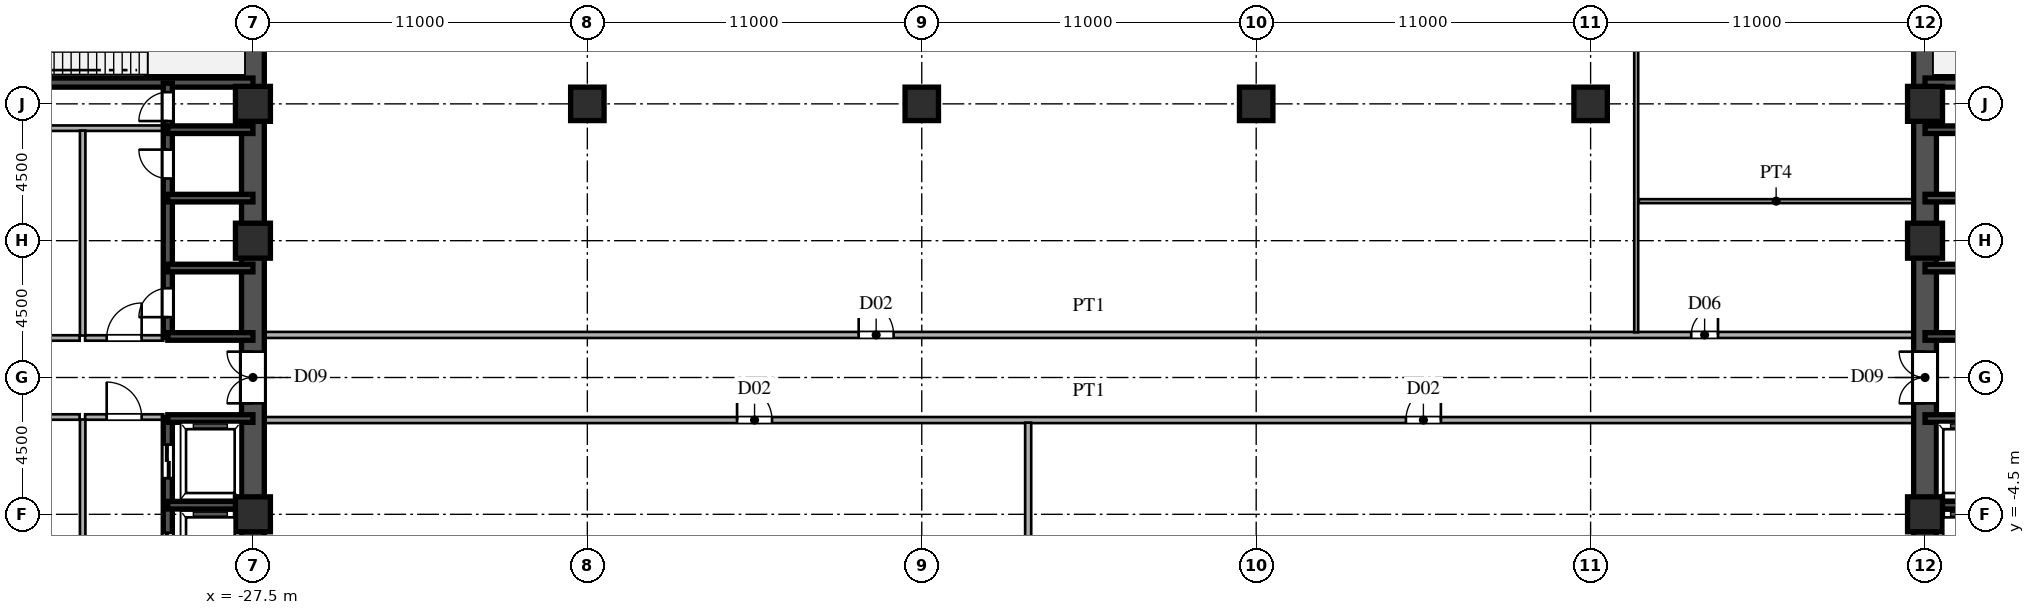
"""IFC4 building model, lengths in metres.
Left out: names, types, materials, properties, quantities, classifications, styles, units other than length and angle.
Written with IfcOpenShell. Run it as: python <this file> out.ifc"""

import sys

from ifc_helpers import new_model, si_unit, direction, frame, frame_2d, origin, origin_2d, place, context, subcontext, project, spatial, rectangle, hollow_rectangle, extrude, source, transform, mapped, element, fill, save


model = new_model("IFC4")
c1 = context("Model", 3, precision=1e-05, world=origin(), true_north=direction((0.0, 1.0)))
c2 = subcontext(c1, "Body", "Model", "MODEL_VIEW")
j1 = project(units=[si_unit("LENGTHUNIT", "METRE"), si_unit("PLANEANGLEUNIT", "RADIAN")], contexts=[c1])
p1 = place(None, origin())
s1 = spatial("IfcSite", under=j1, at=p1, CompositionType="ELEMENT")
p2 = place(p1, origin())
s2 = spatial("IfcBuilding", under=s1, at=p2, CompositionType="ELEMENT")
p3 = place(p2, frame((0.0, 0.0, -9.6)))
s3 = spatial("IfcBuildingStorey", under=s2, at=p3, CompositionType="ELEMENT", Elevation=-9.6)
m1 = source(origin(), c2, "Body", "SweptSolid", [
    extrude(hollow_rectangle(XDim=1.15, YDim=1.15, WallThickness=0.048, at=origin_2d()), origin(), (0.0, 0.0, 1.0), 4.8),
])
for number, where, z_axis, x_axis in (
    (1, (-27.5, -4.5, 0.0), (0.0, 0.0, 1.0), (1.0, 0.0, 0.0)),
    (2, (-27.5, 4.5, 0.0), (0.0, 0.0, 1.0), (1.0, 0.0, 0.0)),
    (3, (-27.5, 9.0, 0.0), (0.0, 0.0, 1.0), (1.0, 0.0, 0.0)),
    (4, (27.5, -4.5, 0.0), (0.0, 0.0, 1.0), (1.0, 0.0, 0.0)),
    (5, (27.5, 4.5, 0.0), (0.0, 0.0, 1.0), (1.0, 0.0, 0.0)),
    (6, (27.5, 9.0, 0.0), (0.0, 0.0, 1.0), (1.0, 0.0, 0.0)),
):
    element("IfcColumn", number, at=place(p3, frame(where, z_axis=z_axis, x_axis=x_axis)), inside=s3, PredefinedType="COLUMN", context=c2, shape_type="MappedRepresentation", body=[
        mapped(m1, transform((0.0, 0.0, 0.0), scale=1.0)),
    ])
m2 = source(origin(), c2, "Body", "SweptSolid", [
    extrude(rectangle(XDim=1.1, YDim=1.1, at=origin_2d()), origin(), (0.0, 0.0, 1.0), 4.8),
])
for number, where, z_axis, x_axis in (
    (7, (-16.5, 9.0, 0.0), (0.0, 0.0, 1.0), (1.0, 0.0, 0.0)),
    (8, (-5.5, 9.0, 0.0), (0.0, 0.0, 1.0), (1.0, 0.0, 0.0)),
    (9, (5.5, 9.0, 0.0), (0.0, 0.0, 1.0), (1.0, 0.0, 0.0)),
    (10, (16.5, 9.0, 0.0), (0.0, 0.0, 1.0), (1.0, 0.0, 0.0)),
):
    element("IfcColumn", number, at=place(p3, frame(where, z_axis=z_axis, x_axis=x_axis)), inside=s3, PredefinedType="COLUMN", context=c2, shape_type="MappedRepresentation", body=[
        mapped(m2, transform((0.0, 0.0, 0.0), scale=1.0)),
    ])
for number, where, z_axis, x_axis in (
    (11, (-27.5, -13.5, 0.0), (0.0, 0.0, 1.0), (0.0, 1.0, 0.0)),
    (12, (-27.5, 1.3, 0.0), (0.0, 0.0, 1.0), (0.0, 1.0, 0.0)),
):
    element("IfcWall", number, at=place(p3, frame(where, z_axis=z_axis, x_axis=x_axis)), inside=s3, PredefinedType="SHEAR", context=c2, shape_type="SweptSolid", body=[
        extrude(rectangle(XDim=12.2, YDim=0.75, at=frame_2d((6.1, 0.0))), origin(), (0.0, 0.0, 1.0), 4.5),
    ])
p4 = place(p3, frame((-27.5, -1.3, 0.0), z_axis=(0.0, 0.0, 1.0), x_axis=(0.0, 1.0, 0.0)))
e13 = element("IfcWall", 13, at=p4, inside=s3, PredefinedType="SHEAR", context=c2, shape_type="SweptSolid", body=[
    extrude(rectangle(XDim=2.6, YDim=0.75, at=frame_2d((1.3, 0.0))), origin(), (0.0, 0.0, 1.0), 4.5),
])
p5 = place(p4, frame((0.45, 0.0, 0.0)))
e14 = element("IfcOpeningElement", 14, at=p5, cuts=e13, PredefinedType="OPENING", context=c2, shape_type="SweptSolid", body=[
    extrude(rectangle(XDim=1.7, YDim=2.35, at=frame_2d((0.85, 1.175))), frame((0.0, 0.385, 0.0), z_axis=(0.0, -1.0, 0.0), x_axis=(1.0, 0.0, 0.0)), (0.0, 0.0, 1.0), 0.77),
])
p6 = place(p3, frame((-36.5, 9.7, 0.0), z_axis=(0.0, 0.0, 1.0), x_axis=(1.0, 0.0, 0.0)))
e15 = element("IfcWall", 15, at=p6, inside=s3, PredefinedType="SHEAR", context=c2, shape_type="SweptSolid", body=[
    extrude(rectangle(XDim=9.0, YDim=0.3, at=frame_2d((4.5, 0.0))), origin(), (0.0, 0.0, 1.0), 4.5),
])
p7 = place(p6, frame((0.6, 0.0, 0.0)))
e16 = element("IfcOpeningElement", 16, at=p7, cuts=e15, PredefinedType="OPENING", context=c2, shape_type="SweptSolid", body=[
    extrude(rectangle(XDim=1.1, YDim=2.2, at=frame_2d((0.55, 1.1))), frame((0.0, 0.16, 0.0), z_axis=(0.0, -1.0, 0.0), x_axis=(1.0, 0.0, 0.0)), (0.0, 0.0, 1.0), 0.32),
])
for number, where, z_axis, x_axis in (
    (17, (-30.3, -4.2, 0.0), (0.0, 0.0, 1.0), (1.0, 0.0, 0.0)),
    (18, (-30.3, -1.35, 0.0), (0.0, 0.0, 1.0), (1.0, 0.0, 0.0)),
    (19, (-30.3, 1.35, 0.0), (0.0, 0.0, 1.0), (1.0, 0.0, 0.0)),
    (20, (-30.3, 3.6, 0.0), (0.0, 0.0, 1.0), (1.0, 0.0, 0.0)),
    (21, (-30.3, 5.9, 0.0), (0.0, 0.0, 1.0), (1.0, 0.0, 0.0)),
    (22, (-30.3, 8.15, 0.0), (0.0, 0.0, 1.0), (1.0, 0.0, 0.0)),
):
    element("IfcWall", number, at=place(p3, frame(where, z_axis=z_axis, x_axis=x_axis)), inside=s3, PredefinedType="SHEAR", context=c2, shape_type="SweptSolid", body=[
        extrude(rectangle(XDim=2.8, YDim=0.25, at=frame_2d((1.4, 0.0))), origin(), (0.0, 0.0, 1.0), 4.5),
    ])
p8 = place(p3, frame((-30.3, -7.12, 0.0), z_axis=(0.0, 0.0, 1.0), x_axis=(0.0, 1.0, 0.0)))
e23 = element("IfcWall", 23, at=p8, inside=s3, PredefinedType="SHEAR", context=c2, shape_type="SweptSolid", body=[
    extrude(rectangle(XDim=2.92, YDim=0.3, at=frame_2d((1.46, 0.0))), origin(), (0.0, 0.0, 1.0), 4.5),
])
p9 = place(p8, frame((0.91, 0.0, 0.0)))
e24 = element("IfcOpeningElement", 24, at=p9, cuts=e23, PredefinedType="OPENING", context=c2, shape_type="SweptSolid", body=[
    extrude(rectangle(XDim=1.1, YDim=2.2, at=frame_2d((0.55, 1.1))), frame((0.0, 0.16, 0.0), z_axis=(0.0, -1.0, 0.0), x_axis=(1.0, 0.0, 0.0)), (0.0, 0.0, 1.0), 0.32),
])
p10 = place(p3, frame((-30.3, -4.2, 0.0), z_axis=(0.0, 0.0, 1.0), x_axis=(0.0, 1.0, 0.0)))
e25 = element("IfcWall", 25, at=p10, inside=s3, PredefinedType="SHEAR", context=c2, shape_type="SweptSolid", body=[
    extrude(rectangle(XDim=2.88, YDim=0.3, at=frame_2d((1.44, 0.0))), origin(), (0.0, 0.0, 1.0), 4.5),
])
p11 = place(p10, frame((0.89, 0.0, 0.0)))
e26 = element("IfcOpeningElement", 26, at=p11, cuts=e25, PredefinedType="OPENING", context=c2, shape_type="SweptSolid", body=[
    extrude(rectangle(XDim=1.1, YDim=2.2, at=frame_2d((0.55, 1.1))), frame((0.0, 0.16, 0.0), z_axis=(0.0, -1.0, 0.0), x_axis=(1.0, 0.0, 0.0)), (0.0, 0.0, 1.0), 0.32),
])
p12 = place(p3, frame((-30.3, 1.32, 0.0), z_axis=(0.0, 0.0, 1.0), x_axis=(0.0, 1.0, 0.0)))
e27 = element("IfcWall", 27, at=p12, inside=s3, PredefinedType="SHEAR", context=c2, shape_type="SweptSolid", body=[
    extrude(rectangle(XDim=2.28, YDim=0.3, at=frame_2d((1.14, 0.0))), origin(), (0.0, 0.0, 1.0), 4.5),
])
p13 = place(p12, frame((0.665, 0.0, 0.0)))
e28 = element("IfcOpeningElement", 28, at=p13, cuts=e27, PredefinedType="OPENING", context=c2, shape_type="SweptSolid", body=[
    extrude(rectangle(XDim=0.95, YDim=2.15, at=frame_2d((0.475, 1.075))), frame((0.0, 0.16, 0.0), z_axis=(0.0, -1.0, 0.0), x_axis=(1.0, 0.0, 0.0)), (0.0, 0.0, 1.0), 0.32),
])
p14 = place(p3, frame((-30.3, 3.6, 0.0), z_axis=(0.0, 0.0, 1.0), x_axis=(0.0, 1.0, 0.0)))
e29 = element("IfcWall", 29, at=p14, inside=s3, PredefinedType="SHEAR", context=c2, shape_type="SweptSolid", body=[
    extrude(rectangle(XDim=2.3, YDim=0.3, at=frame_2d((1.15, 0.0))), origin(), (0.0, 0.0, 1.0), 4.5),
])
p15 = place(p3, frame((-30.3, 5.9, 0.0), z_axis=(0.0, 0.0, 1.0), x_axis=(0.0, 1.0, 0.0)))
e30 = element("IfcWall", 30, at=p15, inside=s3, PredefinedType="SHEAR", context=c2, shape_type="SweptSolid", body=[
    extrude(rectangle(XDim=2.25, YDim=0.3, at=frame_2d((1.125, 0.0))), origin(), (0.0, 0.0, 1.0), 4.5),
])
p16 = place(p15, frame((0.645, 0.0, 0.0)))
e31 = element("IfcOpeningElement", 31, at=p16, cuts=e30, PredefinedType="OPENING", context=c2, shape_type="SweptSolid", body=[
    extrude(rectangle(XDim=0.95, YDim=2.15, at=frame_2d((0.475, 1.075))), frame((0.0, 0.16, 0.0), z_axis=(0.0, -1.0, 0.0), x_axis=(1.0, 0.0, 0.0)), (0.0, 0.0, 1.0), 0.32),
])
p17 = place(p3, frame((-30.3, 8.15, 0.0), z_axis=(0.0, 0.0, 1.0), x_axis=(0.0, 1.0, 0.0)))
e32 = element("IfcWall", 32, at=p17, inside=s3, PredefinedType="SHEAR", context=c2, shape_type="SweptSolid", body=[
    extrude(rectangle(XDim=1.53, YDim=0.3, at=frame_2d((0.765, 0.0))), origin(), (0.0, 0.0, 1.0), 4.5),
])
p18 = place(p17, frame((0.285, 0.0, 0.0)))
e33 = element("IfcOpeningElement", 33, at=p18, cuts=e32, PredefinedType="OPENING", context=c2, shape_type="SweptSolid", body=[
    extrude(rectangle(XDim=0.95, YDim=2.15, at=frame_2d((0.475, 1.075))), frame((0.0, 0.16, 0.0), z_axis=(0.0, -1.0, 0.0), x_axis=(1.0, 0.0, 0.0)), (0.0, 0.0, 1.0), 0.32),
])
p19 = place(p3, frame((-36.15, 8.2, 0.0), z_axis=(0.0, 0.0, 1.0), x_axis=(1.0, 0.0, 0.0)))
e34 = element("IfcWall", 34, at=p19, inside=s3, PredefinedType="PARTITIONING", context=c2, shape_type="SweptSolid", body=[
    extrude(rectangle(XDim=5.7, YDim=0.18, at=frame_2d((2.85, 0.0))), origin(), (0.0, 0.0, 1.0), 4.5),
])
p20 = place(p3, frame((-33.1, -6.42, 0.0), z_axis=(0.0, 0.0, 1.0), x_axis=(0.0, 1.0, 0.0)))
e35 = element("IfcWall", 35, at=p20, inside=s3, PredefinedType="PARTITIONING", context=c2, shape_type="SweptSolid", body=[
    extrude(rectangle(XDim=5.04, YDim=0.18, at=frame_2d((2.52, 0.0))), origin(), (0.0, 0.0, 1.0), 4.5),
])
p21 = place(p3, frame((-33.1, 1.38, 0.0), z_axis=(0.0, 0.0, 1.0), x_axis=(0.0, 1.0, 0.0)))
e36 = element("IfcWall", 36, at=p21, inside=s3, PredefinedType="PARTITIONING", context=c2, shape_type="SweptSolid", body=[
    extrude(rectangle(XDim=6.74, YDim=0.18, at=frame_2d((3.37, 0.0))), origin(), (0.0, 0.0, 1.0), 4.5),
])
p22 = place(p3, frame((-33.02, -1.3, 0.0), z_axis=(0.0, 0.0, 1.0), x_axis=(1.0, 0.0, 0.0)))
e37 = element("IfcWall", 37, at=p22, inside=s3, PredefinedType="PARTITIONING", context=c2, shape_type="SweptSolid", body=[
    extrude(rectangle(XDim=2.57, YDim=0.18, at=frame_2d((1.285, 0.0))), origin(), (0.0, 0.0, 1.0), 4.5),
])
p23 = place(p22, frame((0.71, 0.0, 0.0)))
e38 = element("IfcOpeningElement", 38, at=p23, cuts=e37, PredefinedType="OPENING", context=c2, shape_type="SweptSolid", body=[
    extrude(rectangle(XDim=1.15, YDim=2.2, at=frame_2d((0.575, 1.1))), frame((0.0, 0.1, 0.0), z_axis=(0.0, -1.0, 0.0), x_axis=(1.0, 0.0, 0.0)), (0.0, 0.0, 1.0), 0.2),
])
p24 = place(p3, frame((-33.02, 1.3, 0.0), z_axis=(0.0, 0.0, 1.0), x_axis=(1.0, 0.0, 0.0)))
e39 = element("IfcWall", 39, at=p24, inside=s3, PredefinedType="PARTITIONING", context=c2, shape_type="SweptSolid", body=[
    extrude(rectangle(XDim=2.57, YDim=0.18, at=frame_2d((1.285, 0.0))), origin(), (0.0, 0.0, 1.0), 4.5),
])
p25 = place(p24, frame((0.71, 0.0, 0.0)))
e40 = element("IfcOpeningElement", 40, at=p25, cuts=e39, PredefinedType="OPENING", context=c2, shape_type="SweptSolid", body=[
    extrude(rectangle(XDim=1.15, YDim=2.2, at=frame_2d((0.575, 1.1))), frame((0.0, 0.1, 0.0), z_axis=(0.0, -1.0, 0.0), x_axis=(1.0, 0.0, 0.0)), (0.0, 0.0, 1.0), 0.2),
])
for number, where, z_axis, x_axis in (
    (41, (-36.15, -1.3, 0.0), (0.0, 0.0, 1.0), (1.0, 0.0, 0.0)),
    (42, (-36.15, 1.3, 0.0), (0.0, 0.0, 1.0), (1.0, 0.0, 0.0)),
):
    element("IfcWall", number, at=place(p3, frame(where, z_axis=z_axis, x_axis=x_axis)), inside=s3, PredefinedType="PARTITIONING", context=c2, shape_type="SweptSolid", body=[
        extrude(rectangle(XDim=2.95, YDim=0.18, at=frame_2d((1.475, 0.0))), origin(), (0.0, 0.0, 1.0), 4.5),
    ])
for number, where, z_axis, x_axis in (
    (43, (27.5, -13.5, 0.0), (0.0, 0.0, 1.0), (0.0, 1.0, 0.0)),
    (44, (27.5, 1.3, 0.0), (0.0, 0.0, 1.0), (0.0, 1.0, 0.0)),
):
    element("IfcWall", number, at=place(p3, frame(where, z_axis=z_axis, x_axis=x_axis)), inside=s3, PredefinedType="SHEAR", context=c2, shape_type="SweptSolid", body=[
        extrude(rectangle(XDim=12.2, YDim=0.75, at=frame_2d((6.1, 0.0))), origin(), (0.0, 0.0, 1.0), 4.5),
    ])
p26 = place(p3, frame((27.5, -1.3, 0.0), z_axis=(0.0, 0.0, 1.0), x_axis=(0.0, 1.0, 0.0)))
e45 = element("IfcWall", 45, at=p26, inside=s3, PredefinedType="SHEAR", context=c2, shape_type="SweptSolid", body=[
    extrude(rectangle(XDim=2.6, YDim=0.75, at=frame_2d((1.3, 0.0))), origin(), (0.0, 0.0, 1.0), 4.5),
])
p27 = place(p26, frame((0.45, 0.0, 0.0)))
e46 = element("IfcOpeningElement", 46, at=p27, cuts=e45, PredefinedType="OPENING", context=c2, shape_type="SweptSolid", body=[
    extrude(rectangle(XDim=1.7, YDim=2.35, at=frame_2d((0.85, 1.175))), frame((0.0, 0.385, 0.0), z_axis=(0.0, -1.0, 0.0), x_axis=(1.0, 0.0, 0.0)), (0.0, 0.0, 1.0), 0.77),
])
p28 = place(p3, frame((27.5, 9.7, 0.0), z_axis=(0.0, 0.0, 1.0), x_axis=(1.0, 0.0, 0.0)))
e47 = element("IfcWall", 47, at=p28, inside=s3, PredefinedType="SHEAR", context=c2, shape_type="SweptSolid", body=[
    extrude(rectangle(XDim=9.0, YDim=0.3, at=frame_2d((4.5, 0.0))), origin(), (0.0, 0.0, 1.0), 4.5),
])
p29 = place(p28, frame((7.3, 0.0, 0.0)))
e48 = element("IfcOpeningElement", 48, at=p29, cuts=e47, PredefinedType="OPENING", context=c2, shape_type="SweptSolid", body=[
    extrude(rectangle(XDim=1.1, YDim=2.2, at=frame_2d((0.55, 1.1))), frame((0.0, 0.16, 0.0), z_axis=(0.0, -1.0, 0.0), x_axis=(1.0, 0.0, 0.0)), (0.0, 0.0, 1.0), 0.32),
])
for number, where, z_axis, x_axis in (
    (49, (27.5, -4.2, 0.0), (0.0, 0.0, 1.0), (1.0, 0.0, 0.0)),
    (50, (27.5, -1.35, 0.0), (0.0, 0.0, 1.0), (1.0, 0.0, 0.0)),
    (51, (27.5, 1.35, 0.0), (0.0, 0.0, 1.0), (1.0, 0.0, 0.0)),
    (52, (27.5, 3.6, 0.0), (0.0, 0.0, 1.0), (1.0, 0.0, 0.0)),
    (53, (27.5, 5.9, 0.0), (0.0, 0.0, 1.0), (1.0, 0.0, 0.0)),
    (54, (27.5, 8.15, 0.0), (0.0, 0.0, 1.0), (1.0, 0.0, 0.0)),
):
    element("IfcWall", number, at=place(p3, frame(where, z_axis=z_axis, x_axis=x_axis)), inside=s3, PredefinedType="SHEAR", context=c2, shape_type="SweptSolid", body=[
        extrude(rectangle(XDim=2.8, YDim=0.25, at=frame_2d((1.4, 0.0))), origin(), (0.0, 0.0, 1.0), 4.5),
    ])
p30 = place(p3, frame((-27.12, -1.4, 0.0), z_axis=(0.0, 0.0, 1.0), x_axis=(1.0, 0.0, 0.0)))
e55 = element("IfcWall", 55, at=p30, inside=s3, PredefinedType="PARTITIONING", context=c2, shape_type="SweptSolid", body=[
    extrude(rectangle(XDim=54.24, YDim=0.2, at=frame_2d((27.12, 0.0))), origin(), (0.0, 0.0, 1.0), 4.5),
])
p31 = place(p30, frame((15.545, 0.0, 0.0)))
e56 = element("IfcOpeningElement", 56, at=p31, cuts=e55, PredefinedType="OPENING", context=c2, shape_type="SweptSolid", body=[
    extrude(rectangle(XDim=1.15, YDim=2.2, at=frame_2d((0.575, 1.1))), frame((0.0, 0.11, 0.0), z_axis=(0.0, -1.0, 0.0), x_axis=(1.0, 0.0, 0.0)), (0.0, 0.0, 1.0), 0.22),
])
p32 = place(p30, frame((37.545, 0.0, 0.0)))
e57 = element("IfcOpeningElement", 57, at=p32, cuts=e55, PredefinedType="OPENING", context=c2, shape_type="SweptSolid", body=[
    extrude(rectangle(XDim=1.15, YDim=2.2, at=frame_2d((0.575, 1.1))), frame((0.0, 0.11, 0.0), z_axis=(0.0, -1.0, 0.0), x_axis=(1.0, 0.0, 0.0)), (0.0, 0.0, 1.0), 0.22),
])
p33 = place(p3, frame((-27.12, 1.4, 0.0), z_axis=(0.0, 0.0, 1.0), x_axis=(1.0, 0.0, 0.0)))
e58 = element("IfcWall", 58, at=p33, inside=s3, PredefinedType="PARTITIONING", context=c2, shape_type="SweptSolid", body=[
    extrude(rectangle(XDim=54.24, YDim=0.2, at=frame_2d((27.12, 0.0))), origin(), (0.0, 0.0, 1.0), 4.5),
])
p34 = place(p33, frame((19.545, 0.0, 0.0)))
e59 = element("IfcOpeningElement", 59, at=p34, cuts=e58, PredefinedType="OPENING", context=c2, shape_type="SweptSolid", body=[
    extrude(rectangle(XDim=1.15, YDim=2.2, at=frame_2d((0.575, 1.1))), frame((0.0, 0.11, 0.0), z_axis=(0.0, -1.0, 0.0), x_axis=(1.0, 0.0, 0.0)), (0.0, 0.0, 1.0), 0.22),
])
p35 = place(p33, frame((46.93, 0.0, 0.0)))
e60 = element("IfcOpeningElement", 60, at=p35, cuts=e58, PredefinedType="OPENING", context=c2, shape_type="SweptSolid", body=[
    extrude(rectangle(XDim=0.88, YDim=2.1, at=frame_2d((0.44, 1.05))), frame((0.0, 0.11, 0.0), z_axis=(0.0, -1.0, 0.0), x_axis=(1.0, 0.0, 0.0)), (0.0, 0.0, 1.0), 0.22),
])
p36 = place(p3, frame((18.085, 5.8, 0.0), z_axis=(0.0, 0.0, 1.0), x_axis=(1.0, 0.0, 0.0)))
e61 = element("IfcWall", 61, at=p36, inside=s3, PredefinedType="PARTITIONING", context=c2, shape_type="SweptSolid", body=[
    extrude(rectangle(XDim=9.035, YDim=0.13, at=frame_2d((4.518, 0.0))), origin(), (0.0, 0.0, 1.0), 4.5),
])
p37 = place(p3, frame((-2.0, -35.77, 0.0), z_axis=(0.0, 0.0, 1.0), x_axis=(0.0, 1.0, 0.0)))
e62 = element("IfcWall", 62, at=p37, inside=s3, PredefinedType="PARTITIONING", context=c2, shape_type="SweptSolid", body=[
    extrude(rectangle(XDim=34.285, YDim=0.2, at=frame_2d((17.143, 0.0))), origin(), (0.0, 0.0, 1.0), 4.5),
])
p38 = place(p3, frame((18.0, 1.485, 0.0), z_axis=(0.0, 0.0, 1.0), x_axis=(0.0, 1.0, 0.0)))
e63 = element("IfcWall", 63, at=p38, inside=s3, PredefinedType="PARTITIONING", context=c2, shape_type="SweptSolid", body=[
    extrude(rectangle(XDim=34.285, YDim=0.13, at=frame_2d((17.143, 0.0))), origin(), (0.0, 0.0, 1.0), 4.5),
])
m3 = source(origin(), c2, "Body", "SweptSolid", [
    extrude(rectangle(XDim=1.7, YDim=2.35, at=frame_2d((0.85, 1.175))), frame((0.0, 0.025, 0.0), z_axis=(0.0, -1.0, 0.0), x_axis=(1.0, 0.0, 0.0)), (0.0, 0.0, 1.0), 0.05),
])
p39 = place(p5, origin())
e64 = element("IfcDoor", 64, at=p39, inside=s3, OperationType="DOUBLE_SWING_LEFT", PredefinedType="DOOR", context=c2, shape_type="MappedRepresentation", body=[
    mapped(m3, transform((0.0, 0.0, 0.0), scale=1.0)),
])
fill(e14, e64)
m4 = source(origin(), c2, "Body", "SweptSolid", [
    extrude(rectangle(XDim=1.1, YDim=2.2, at=frame_2d((0.55, 1.1))), frame((0.0, 0.025, 0.0), z_axis=(0.0, -1.0, 0.0), x_axis=(1.0, 0.0, 0.0)), (0.0, 0.0, 1.0), 0.05),
])
p40 = place(p9, origin())
e65 = element("IfcDoor", 65, at=p40, inside=s3, OperationType="DOUBLE_DOOR_SLIDING", PredefinedType="DOOR", context=c2, shape_type="MappedRepresentation", body=[
    mapped(m4, transform((0.0, 0.0, 0.0), scale=1.0)),
])
fill(e24, e65)
p41 = place(p11, origin())
e66 = element("IfcDoor", 66, at=p41, inside=s3, OperationType="DOUBLE_DOOR_SLIDING", PredefinedType="DOOR", context=c2, shape_type="MappedRepresentation", body=[
    mapped(m4, transform((0.0, 0.0, 0.0), scale=1.0)),
])
fill(e26, e66)
m5 = source(origin(), c2, "Body", "SweptSolid", [
    extrude(rectangle(XDim=0.95, YDim=2.15, at=frame_2d((0.475, 1.075))), frame((0.0, 0.025, 0.0), z_axis=(0.0, -1.0, 0.0), x_axis=(1.0, 0.0, 0.0)), (0.0, 0.0, 1.0), 0.05),
])
p42 = place(p13, origin())
e67 = element("IfcDoor", 67, at=p42, inside=s3, OperationType="SINGLE_SWING_LEFT", PredefinedType="DOOR", context=c2, shape_type="MappedRepresentation", body=[
    mapped(m5, transform((0.0, 0.0, 0.0), scale=1.0)),
])
fill(e28, e67)
p43 = place(p16, origin())
e68 = element("IfcDoor", 68, at=p43, inside=s3, OperationType="SINGLE_SWING_RIGHT", PredefinedType="DOOR", context=c2, shape_type="MappedRepresentation", body=[
    mapped(m5, transform((0.0, 0.0, 0.0), scale=1.0)),
])
fill(e31, e68)
p44 = place(p18, origin())
e69 = element("IfcDoor", 69, at=p44, inside=s3, OperationType="SINGLE_SWING_LEFT", PredefinedType="DOOR", context=c2, shape_type="MappedRepresentation", body=[
    mapped(m5, transform((0.0, 0.0, 0.0), scale=1.0)),
])
fill(e33, e69)
m6 = source(origin(), c2, "Body", "SweptSolid", [
    extrude(rectangle(XDim=1.15, YDim=2.2, at=frame_2d((0.575, 1.1))), frame((0.0, 0.025, 0.0), z_axis=(0.0, -1.0, 0.0), x_axis=(1.0, 0.0, 0.0)), (0.0, 0.0, 1.0), 0.05),
])
p45 = place(p23, origin())
e70 = element("IfcDoor", 70, at=p45, inside=s3, OperationType="SINGLE_SWING_LEFT", PredefinedType="DOOR", context=c2, shape_type="MappedRepresentation", body=[
    mapped(m6, transform((0.0, 0.0, 0.0), scale=1.0)),
])
fill(e38, e70)
p46 = place(p25, origin())
e71 = element("IfcDoor", 71, at=p46, inside=s3, OperationType="SINGLE_SWING_RIGHT", PredefinedType="DOOR", context=c2, shape_type="MappedRepresentation", body=[
    mapped(m6, transform((0.0, 0.0, 0.0), scale=1.0)),
])
fill(e40, e71)
p47 = place(p27, origin())
e72 = element("IfcDoor", 72, at=p47, inside=s3, OperationType="DOUBLE_SWING_LEFT", PredefinedType="DOOR", context=c2, shape_type="MappedRepresentation", body=[
    mapped(m3, transform((0.0, 0.0, 0.0), scale=1.0)),
])
fill(e46, e72)
p48 = place(p31, origin())
e73 = element("IfcDoor", 73, at=p48, inside=s3, OperationType="SINGLE_SWING_LEFT", PredefinedType="DOOR", context=c2, shape_type="MappedRepresentation", body=[
    mapped(m6, transform((0.0, 0.0, 0.0), scale=1.0)),
])
fill(e56, e73)
p49 = place(p32, origin())
e74 = element("IfcDoor", 74, at=p49, inside=s3, OperationType="SINGLE_SWING_RIGHT", PredefinedType="DOOR", context=c2, shape_type="MappedRepresentation", body=[
    mapped(m6, transform((0.0, 0.0, 0.0), scale=1.0)),
])
fill(e57, e74)
p50 = place(p34, origin())
e75 = element("IfcDoor", 75, at=p50, inside=s3, OperationType="SINGLE_SWING_LEFT", PredefinedType="DOOR", context=c2, shape_type="MappedRepresentation", body=[
    mapped(m6, transform((0.0, 0.0, 0.0), scale=1.0)),
])
fill(e59, e75)
m7 = source(origin(), c2, "Body", "SweptSolid", [
    extrude(rectangle(XDim=0.88, YDim=2.1, at=frame_2d((0.44, 1.05))), frame((0.0, 0.025, 0.0), z_axis=(0.0, -1.0, 0.0), x_axis=(1.0, 0.0, 0.0)), (0.0, 0.0, 1.0), 0.05),
])
p51 = place(p35, origin())
e76 = element("IfcDoor", 76, at=p51, inside=s3, OperationType="SINGLE_SWING_RIGHT", PredefinedType="DOOR", context=c2, shape_type="MappedRepresentation", body=[
    mapped(m7, transform((0.0, 0.0, 0.0), scale=1.0)),
])
fill(e60, e76)
save(model, sys.argv[1])
